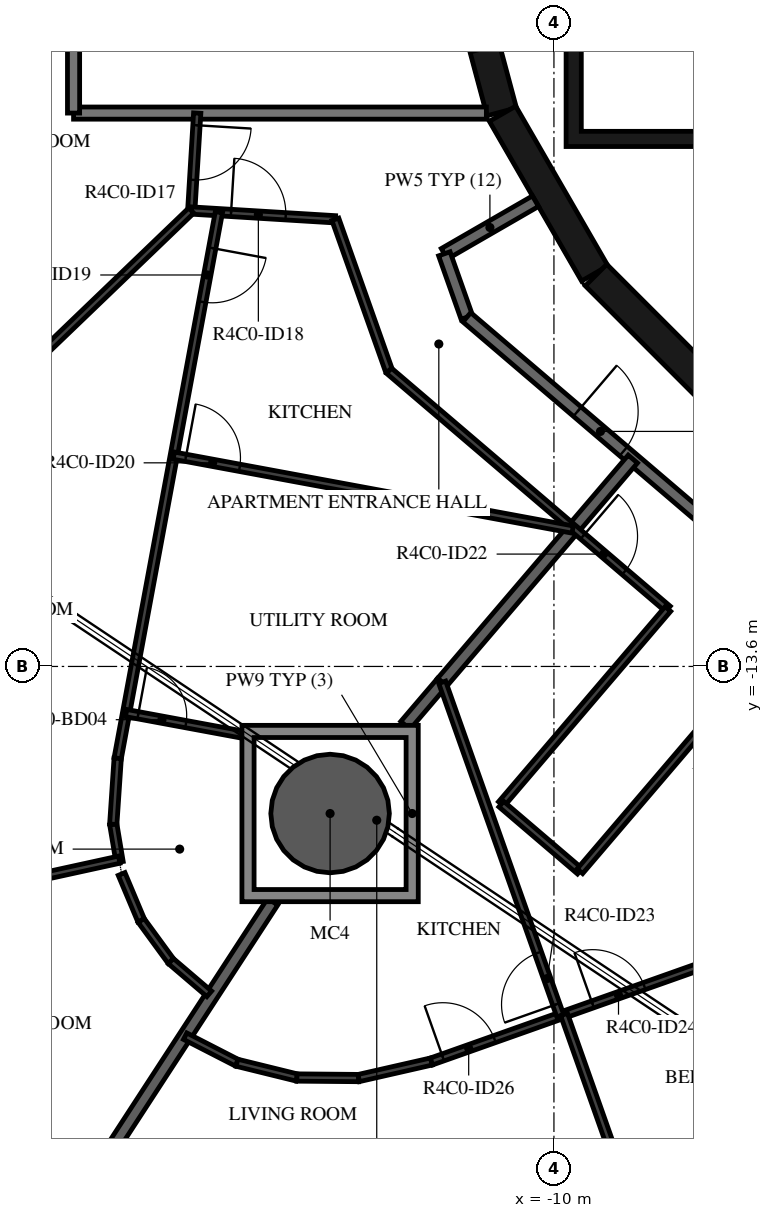
"""IFC4 building model, lengths in metres.
Left out: names, types, materials, properties, quantities, classifications, styles, units other than length and angle.
Written with IfcOpenShell. Run it as: python <this file> out.ifc"""

import sys

from ifc_helpers import new_model, si_unit, direction, frame, frame_2d, origin, origin_2d, place, context, subcontext, project, spatial, polyline, rectangle, hollow_circle, outline, extrude, element, fill, save


model = new_model("IFC4")
c1 = context("Model", 3, precision=1e-05, world=origin(), true_north=direction((0.0, 1.0)))
c2 = subcontext(c1, "Body", "Model", "MODEL_VIEW")
j1 = project(units=[si_unit("LENGTHUNIT", "METRE"), si_unit("PLANEANGLEUNIT", "RADIAN")], contexts=[c1])
p1 = place(None, origin())
s1 = spatial("IfcSite", under=j1, at=p1, CompositionType="ELEMENT")
p2 = place(p1, origin())
s2 = spatial("IfcBuilding", under=s1, at=p2, CompositionType="ELEMENT")
p3 = place(p2, frame((0.0, 0.0, 179.7)))
s3 = spatial("IfcBuildingStorey", under=s2, at=p3, CompositionType="ELEMENT", Elevation=179.7)
p4 = place(p3, frame((-13.681, -16.019, -0.38), z_axis=(0.0, 0.0, 1.0), x_axis=(1.0, 0.0, 0.0)))
e1 = element("IfcColumn", 1, at=p4, inside=s3, PredefinedType="COLUMN", context=c2, shape_type="SweptSolid", body=[
    extrude(hollow_circle(Radius=0.975, WallThickness=0.045, at=origin_2d()), origin(), (0.0, 0.0, 1.0), 2.616),
])
p5 = place(p3, frame((-11.643, -1.55, 0.0), z_axis=(0.0, 0.0, 1.0), x_axis=(0.258734743916, -0.965948410781, 0.0)))
e2 = element("IfcWall", 2, at=p5, inside=s3, PredefinedType="SHEAR", context=c2, shape_type="SweptSolid", body=[
    extrude(rectangle(XDim=3.033, YDim=0.5, at=frame_2d((1.516, 0.0))), origin(), (0.0, 0.0, 1.0), 3.05),
])
p6 = place(p5, frame((1.066, 0.0, 0.0)))
e3 = element("IfcOpeningElement", 3, at=p6, cuts=e2, PredefinedType="OPENING", context=c2, shape_type="SweptSolid", body=[
    extrude(rectangle(XDim=0.9, YDim=2.1, at=frame_2d((0.45, 1.05))), frame((0.0, 0.26, 0.0), z_axis=(0.0, -1.0, 0.0), x_axis=(1.0, 0.0, 0.0)), (0.0, 0.0, 1.0), 0.52),
])
p7 = place(p3, frame((-10.845, -4.51, 0.0), z_axis=(0.0, 0.0, 1.0), x_axis=(0.500087131594, -0.865975092491, 0.0)))
e4 = element("IfcWall", 4, at=p7, inside=s3, PredefinedType="SHEAR", context=c2, shape_type="SweptSolid", body=[
    extrude(rectangle(XDim=3.033, YDim=0.5, at=frame_2d((1.516, 0.0))), origin(), (0.0, 0.0, 1.0), 3.05),
])
p8 = place(p3, frame((-9.308, -7.164, 0.0), z_axis=(0.0, 0.0, 1.0), x_axis=(0.707106781187, -0.707106781187, 0.0)))
e5 = element("IfcWall", 5, at=p8, inside=s3, PredefinedType="SHEAR", context=c2, shape_type="SweptSolid", body=[
    extrude(rectangle(XDim=3.032, YDim=0.5, at=frame_2d((1.516, 0.0))), origin(), (0.0, 0.0, 1.0), 3.05),
])
p9 = place(p3, origin())
e6 = element("IfcWall", 6, at=p9, inside=s3, PredefinedType="SHEAR", context=c2, shape_type="SweptSolid", body=[
    extrude(outline(polyline([(9.8, -5.05), (9.8, -4.8), (9.8, -1.9), (9.55, -1.9), (9.55, -4.8), (7.65, -4.8), (7.65, -1.9), (7.4, -1.9), (7.4, -4.8), (5.5, -4.8), (5.5, -1.9), (5.25, -1.9), (5.25, -4.8), (3.35, -4.8), (3.35, -1.9), (3.1, -1.9), (3.1, -4.8), (1.2, -4.8), (1.2, -1.9), (0.95, -1.9), (0.95, -4.8), (-5.25, -4.8), (-5.25, -1.9), (-5.5, -1.9), (-5.5, -4.8), (-7.4, -4.8), (-7.4, -1.9), (-7.65, -1.9), (-7.65, -4.8), (-9.55, -4.8), (-9.55, -1.9), (-9.8, -1.9), (-9.8, -4.8), (-9.8, -5.05), (9.8, -5.05)])), origin(), (0.0, 0.0, 1.0), 3.05),
])
p10 = place(p3, frame((-10.303, -5.949, 0.0), z_axis=(0.0, 0.0, 1.0), x_axis=(-0.866021168401, -0.500007335828, 0.0)))
e7 = element("IfcWall", 7, at=p10, inside=s3, PredefinedType="STANDARD", context=c2, shape_type="SweptSolid", body=[
    extrude(rectangle(XDim=1.731, YDim=0.2, at=frame_2d((0.865, 0.0))), origin(), (0.0, 0.0, 1.0), 3.05),
])
p11 = place(p3, frame((-11.802, -6.814, 0.0), z_axis=(0.0, 0.0, 1.0), x_axis=(0.333904297771, -0.942606980629, 0.0)))
e8 = element("IfcWall", 8, at=p11, inside=s3, PredefinedType="STANDARD", context=c2, shape_type="SweptSolid", body=[
    extrude(rectangle(XDim=1.107, YDim=0.2, at=frame_2d((0.553, 0.0))), origin(), (0.0, 0.0, 1.0), 3.05),
])
p12 = place(p3, frame((-11.433, -7.858, 0.0), z_axis=(0.0, 0.0, 1.0), x_axis=(0.760412154545, -0.649440801937, 0.0)))
e9 = element("IfcWall", 9, at=p12, inside=s3, PredefinedType="STANDARD", context=c2, shape_type="SweptSolid", body=[
    extrude(rectangle(XDim=7.181, YDim=0.2, at=frame_2d((3.59, 0.0))), origin(), (0.0, 0.0, 1.0), 3.05),
])
p13 = place(p12, frame((2.39, 0.0, 0.0)))
e10 = element("IfcOpeningElement", 10, at=p13, cuts=e9, PredefinedType="OPENING", context=c2, shape_type="SweptSolid", body=[
    extrude(rectangle(XDim=1.0, YDim=2.1, at=frame_2d((0.5, 1.05))), frame((0.0, 0.11, 0.0), z_axis=(0.0, -1.0, 0.0), x_axis=(1.0, 0.0, 0.0)), (0.0, 0.0, 1.0), 0.22),
])
p14 = place(p3, frame((-17.9, -4.5, 0.0), z_axis=(0.0, 0.0, 1.0), x_axis=(1.0, 0.0, 0.0)))
e11 = element("IfcWall", 11, at=p14, inside=s3, PredefinedType="STANDARD", context=c2, shape_type="SweptSolid", body=[
    extrude(rectangle(XDim=6.789, YDim=0.2, at=frame_2d((3.394, 0.0))), origin(), (0.0, 0.0, 1.0), 3.05),
])
p15 = place(p3, frame((-17.9, 4.5, 0.0), z_axis=(0.0, 0.0, 1.0), x_axis=(0.0, -1.0, 0.0)))
e12 = element("IfcWall", 12, at=p15, inside=s3, PredefinedType="STANDARD", context=c2, shape_type="SweptSolid", body=[
    extrude(rectangle(XDim=9.0, YDim=0.2, at=frame_2d((4.5, 0.0))), origin(), (0.0, 0.0, 1.0), 3.05),
])
p16 = place(p3, frame((-11.838, -13.86, 0.0), z_axis=(0.0, 0.0, 1.0), x_axis=(0.64944503311, 0.760408540831, 0.0)))
e13 = element("IfcWall", 13, at=p16, inside=s3, PredefinedType="STANDARD", context=c2, shape_type="SweptSolid", body=[
    extrude(rectangle(XDim=4.827, YDim=0.2, at=frame_2d((2.414, 0.0))), origin(), (0.0, 0.0, 1.0), 3.05),
])
p17 = place(p3, frame((-12.443, -14.569, 0.0), z_axis=(0.0, 0.0, 1.0), x_axis=(0.649517408851, 0.760346720648, 0.0)))
e14 = element("IfcWall", 14, at=p17, inside=s3, PredefinedType="STANDARD", context=c2, shape_type="SweptSolid", body=[
    extrude(rectangle(XDim=0.932, YDim=0.2, at=frame_2d((0.466, 0.0))), origin(), (0.0, 0.0, 1.0), 3.05),
])
p18 = place(p3, frame((-18.04, -22.713, 0.0), z_axis=(0.0, 0.0, 1.0), x_axis=(0.545628572271, 0.838027124335, 0.0)))
e15 = element("IfcWall", 15, at=p18, inside=s3, PredefinedType="STANDARD", context=c2, shape_type="SweptSolid", body=[
    extrude(rectangle(XDim=6.258, YDim=0.2, at=frame_2d((3.129, 0.0))), origin(), (0.0, 0.0, 1.0), 3.05),
])
p19 = place(p3, frame((-15.866, -4.5, 0.0), z_axis=(0.0, 0.0, 1.0), x_axis=(-0.060986374837, -0.998138598635, 0.0)))
e16 = element("IfcWall", 16, at=p19, inside=s3, PredefinedType="PARTITIONING", context=c2, shape_type="SweptSolid", body=[
    extrude(rectangle(XDim=1.605, YDim=0.12, at=frame_2d((0.803, 0.0))), origin(), (0.0, 0.0, 1.0), 3.05),
])
p20 = place(p19, frame((0.2, 0.0, 0.0)))
e17 = element("IfcOpeningElement", 17, at=p20, cuts=e16, PredefinedType="OPENING", context=c2, shape_type="SweptSolid", body=[
    extrude(rectangle(XDim=0.9, YDim=2.1, at=frame_2d((0.45, 1.05))), frame((0.0, 0.07, 0.0), z_axis=(0.0, -1.0, 0.0), x_axis=(1.0, 0.0, 0.0)), (0.0, 0.0, 1.0), 0.14),
])
p21 = place(p3, frame((-15.964, -6.102, 0.0), z_axis=(0.0, 0.0, 1.0), x_axis=(0.998145469708, -0.060873814574, 0.0)))
e18 = element("IfcWall", 18, at=p21, inside=s3, PredefinedType="PARTITIONING", context=c2, shape_type="SweptSolid", body=[
    extrude(rectangle(XDim=2.374, YDim=0.12, at=frame_2d((1.187, 0.0))), origin(), (0.0, 0.0, 1.0), 3.05),
])
p22 = place(p21, frame((0.656, 0.0, 0.0)))
e19 = element("IfcOpeningElement", 19, at=p22, cuts=e18, PredefinedType="OPENING", context=c2, shape_type="SweptSolid", body=[
    extrude(rectangle(XDim=0.9, YDim=2.1, at=frame_2d((0.45, 1.05))), frame((0.0, 0.07, 0.0), z_axis=(0.0, -1.0, 0.0), x_axis=(1.0, 0.0, 0.0)), (0.0, 0.0, 1.0), 0.14),
])
p23 = place(p3, frame((-13.594, -6.247, 0.0), z_axis=(0.0, 0.0, 1.0), x_axis=(0.333777006894, -0.942652061828, 0.0)))
e20 = element("IfcWall", 20, at=p23, inside=s3, PredefinedType="PARTITIONING", context=c2, shape_type="SweptSolid", body=[
    extrude(rectangle(XDim=2.642, YDim=0.12, at=frame_2d((1.321, 0.0))), origin(), (0.0, 0.0, 1.0), 3.05),
])
p24 = place(p3, frame((-12.713, -8.737, 0.0), z_axis=(0.0, 0.0, 1.0), x_axis=(0.760432387723, -0.649417110725, 0.0)))
e21 = element("IfcWall", 21, at=p24, inside=s3, PredefinedType="PARTITIONING", context=c2, shape_type="SweptSolid", body=[
    extrude(rectangle(XDim=6.032, YDim=0.12, at=frame_2d((3.016, 0.0))), origin(), (0.0, 0.0, 1.0), 3.05),
])
p25 = place(p24, frame((4.192, 0.0, 0.0)))
e22 = element("IfcOpeningElement", 22, at=p25, cuts=e21, PredefinedType="OPENING", context=c2, shape_type="SweptSolid", body=[
    extrude(rectangle(XDim=0.9, YDim=2.1, at=frame_2d((0.45, 1.05))), frame((0.0, 0.07, 0.0), z_axis=(0.0, -1.0, 0.0), x_axis=(1.0, 0.0, 0.0)), (0.0, 0.0, 1.0), 0.14),
])
p26 = place(p3, frame((-20.849, -10.792, 0.0), z_axis=(0.0, 0.0, 1.0), x_axis=(0.721364983662, 0.692555095531, 0.0)))
e23 = element("IfcWall", 23, at=p26, inside=s3, PredefinedType="PARTITIONING", context=c2, shape_type="SweptSolid", body=[
    extrude(rectangle(XDim=6.771, YDim=0.12, at=frame_2d((3.385, 0.0))), origin(), (0.0, 0.0, 1.0), 3.05),
])
p27 = place(p3, frame((-15.51, -6.13, 0.0), z_axis=(0.0, 0.0, 1.0), x_axis=(-0.182243361628, -0.98325345519, 0.0)))
e24 = element("IfcWall", 24, at=p27, inside=s3, PredefinedType="PARTITIONING", context=c2, shape_type="SweptSolid", body=[
    extrude(rectangle(XDim=9.134, YDim=0.12, at=frame_2d((4.567, 0.0))), origin(), (0.0, 0.0, 1.0), 3.05),
])
p28 = place(p27, frame((0.6, 0.0, 0.0)))
e25 = element("IfcOpeningElement", 25, at=p28, cuts=e24, PredefinedType="OPENING", context=c2, shape_type="SweptSolid", body=[
    extrude(rectangle(XDim=0.9, YDim=2.1, at=frame_2d((0.45, 1.05))), frame((0.0, 0.07, 0.0), z_axis=(0.0, -1.0, 0.0), x_axis=(1.0, 0.0, 0.0)), (0.0, 0.0, 1.0), 0.14),
])
p29 = place(p3, frame((-16.252, -10.133, 0.0), z_axis=(0.0, 0.0, 1.0), x_axis=(0.983256998026, -0.182224246005, 0.0)))
e26 = element("IfcWall", 26, at=p29, inside=s3, PredefinedType="PARTITIONING", context=c2, shape_type="SweptSolid", body=[
    extrude(rectangle(XDim=6.671, YDim=0.12, at=frame_2d((3.335, 0.0))), origin(), (0.0, 0.0, 1.0), 3.05),
])
p30 = place(p29, frame((0.2, 0.0, 0.0)))
e27 = element("IfcOpeningElement", 27, at=p30, cuts=e26, PredefinedType="OPENING", context=c2, shape_type="SweptSolid", body=[
    extrude(rectangle(XDim=0.9, YDim=2.1, at=frame_2d((0.45, 1.05))), frame((0.0, 0.07, 0.0), z_axis=(0.0, -1.0, 0.0), x_axis=(1.0, 0.0, 0.0)), (0.0, 0.0, 1.0), 0.14),
])
p31 = place(p3, frame((-17.143, -16.817, 0.0), z_axis=(0.0, 0.0, 1.0), x_axis=(-0.164964120994, 0.98629956848, 0.0)))
e28 = element("IfcWall", 28, at=p31, inside=s3, PredefinedType="PARTITIONING", context=c2, shape_type="SweptSolid", body=[
    extrude(rectangle(XDim=0.63, YDim=0.12, at=frame_2d((0.315, 0.0))), origin(), (0.0, 0.0, 1.0), 3.05),
])
p32 = place(p3, frame((-17.247, -16.195, 0.0), z_axis=(0.0, 0.0, 1.0), x_axis=(0.066712820538, 0.997772218282, 0.0)))
e29 = element("IfcWall", 29, at=p32, inside=s3, PredefinedType="PARTITIONING", context=c2, shape_type="SweptSolid", body=[
    extrude(rectangle(XDim=1.087, YDim=0.12, at=frame_2d((0.543, 0.0))), origin(), (0.0, 0.0, 1.0), 3.05),
])
p33 = place(p3, frame((-21.453, -17.719, 0.0), z_axis=(0.0, 0.0, 1.0), x_axis=(0.976887361549, 0.213754725903, 0.0)))
e30 = element("IfcWall", 30, at=p33, inside=s3, PredefinedType="PARTITIONING", context=c2, shape_type="SweptSolid", body=[
    extrude(rectangle(XDim=4.405, YDim=0.12, at=frame_2d((2.203, 0.0))), origin(), (0.0, 0.0, 1.0), 3.05),
])
p34 = place(p33, frame((0.2, 0.0, 0.0)))
e31 = element("IfcOpeningElement", 31, at=p34, cuts=e30, PredefinedType="OPENING", context=c2, shape_type="SweptSolid", body=[
    extrude(rectangle(XDim=0.9, YDim=2.1, at=frame_2d((0.45, 1.05))), frame((0.0, 0.07, 0.0), z_axis=(0.0, -1.0, 0.0), x_axis=(1.0, 0.0, 0.0)), (0.0, 0.0, 1.0), 0.14),
])
p35 = place(p3, frame((-17.036, -14.366, 0.0), z_axis=(0.0, 0.0, 1.0), x_axis=(0.983259435886, -0.182211091156, 0.0)))
e32 = element("IfcWall", 32, at=p35, inside=s3, PredefinedType="PARTITIONING", context=c2, shape_type="SweptSolid", body=[
    extrude(rectangle(XDim=1.938, YDim=0.12, at=frame_2d((0.969, 0.0))), origin(), (0.0, 0.0, 1.0), 3.05),
])
p36 = place(p35, frame((0.2, 0.0, 0.0)))
e33 = element("IfcOpeningElement", 33, at=p36, cuts=e32, PredefinedType="OPENING", context=c2, shape_type="SweptSolid", body=[
    extrude(rectangle(XDim=0.8, YDim=2.1, at=frame_2d((0.4, 1.05))), frame((0.0, 0.07, 0.0), z_axis=(0.0, -1.0, 0.0), x_axis=(1.0, 0.0, 0.0)), (0.0, 0.0, 1.0), 0.14),
])
for number, where, z_axis, x_axis in (
    (34, (-17.11, -17.013, 0.0), (0.0, 0.0, 1.0), (0.388, -0.922, 0.0)),
    (35, (-16.788, -17.777, 0.0), (0.0, 0.0, 1.0), (0.59, -0.807, 0.0)),
    (36, (-16.299, -18.446, 0.0), (0.0, 0.0, 1.0), (0.76, -0.649, 0.0)),
):
    element("IfcWall", number, at=place(p3, frame(where, z_axis=z_axis, x_axis=x_axis)), inside=s3, PredefinedType="PARTITIONING", context=c2, shape_type="SweptSolid", body=[
        extrude(rectangle(XDim=0.829, YDim=0.12, at=frame_2d((0.415, 0.0))), origin(), (0.0, 0.0, 1.0), 3.05),
    ])
p37 = place(p3, frame((-8.125, -12.655, 0.0), z_axis=(0.0, 0.0, 1.0), x_axis=(-0.649441944702, -0.760411178549, 0.0)))
e37 = element("IfcWall", 37, at=p37, inside=s3, PredefinedType="PARTITIONING", context=c2, shape_type="SweptSolid", body=[
    extrude(rectangle(XDim=4.22, YDim=0.12, at=frame_2d((2.11, 0.0))), origin(), (0.0, 0.0, 1.0), 3.05),
])
p38 = place(p3, frame((-10.866, -15.864, 0.0), z_axis=(0.0, 0.0, 1.0), x_axis=(0.760431300628, -0.649418383652, 0.0)))
e38 = element("IfcWall", 38, at=p38, inside=s3, PredefinedType="PARTITIONING", context=c2, shape_type="SweptSolid", body=[
    extrude(rectangle(XDim=1.7, YDim=0.12, at=frame_2d((0.85, 0.0))), origin(), (0.0, 0.0, 1.0), 3.05),
])
p39 = place(p3, frame((-9.573, -16.968, 0.0), z_axis=(0.0, 0.0, 1.0), x_axis=(0.649437062208, 0.760415348498, 0.0)))
e39 = element("IfcWall", 39, at=p39, inside=s3, PredefinedType="PARTITIONING", context=c2, shape_type="SweptSolid", body=[
    extrude(rectangle(XDim=4.219, YDim=0.12, at=frame_2d((2.11, 0.0))), origin(), (0.0, 0.0, 1.0), 3.05),
])
p40 = place(p3, frame((-16.065, -19.68, 0.0), z_axis=(0.0, 0.0, 1.0), x_axis=(0.889684645268, -0.456575549033, 0.0)))
e40 = element("IfcWall", 40, at=p40, inside=s3, PredefinedType="PARTITIONING", context=c2, shape_type="SweptSolid", body=[
    extrude(rectangle(XDim=0.957, YDim=0.12, at=frame_2d((0.479, 0.0))), origin(), (0.0, 0.0, 1.0), 3.05),
])
p41 = place(p3, frame((-15.214, -20.117, 0.0), z_axis=(0.0, 0.0, 1.0), x_axis=(0.970998575146, -0.239085271534, 0.0)))
e41 = element("IfcWall", 41, at=p41, inside=s3, PredefinedType="PARTITIONING", context=c2, shape_type="SweptSolid", body=[
    extrude(rectangle(XDim=1.016, YDim=0.12, at=frame_2d((0.508, 0.0))), origin(), (0.0, 0.0, 1.0), 3.05),
])
p42 = place(p3, frame((-14.227, -20.36, 0.0), z_axis=(0.0, 0.0, 1.0), x_axis=(0.999960467683, -0.008891741722, 0.0)))
e42 = element("IfcWall", 42, at=p42, inside=s3, PredefinedType="PARTITIONING", context=c2, shape_type="SweptSolid", body=[
    extrude(rectangle(XDim=1.016, YDim=0.12, at=frame_2d((0.508, 0.0))), origin(), (0.0, 0.0, 1.0), 3.05),
])
p43 = place(p3, frame((-13.211, -20.369, 0.0), z_axis=(0.0, 0.0, 1.0), x_axis=(0.974997834831, 0.222214360642, 0.0)))
e43 = element("IfcWall", 43, at=p43, inside=s3, PredefinedType="PARTITIONING", context=c2, shape_type="SweptSolid", body=[
    extrude(rectangle(XDim=1.227, YDim=0.12, at=frame_2d((0.614, 0.0))), origin(), (0.0, 0.0, 1.0), 3.05),
])
p44 = place(p3, frame((-12.015, -20.096, 0.0), z_axis=(0.0, 0.0, 1.0), x_axis=(0.942638913957, 0.33381413675, 0.0)))
e44 = element("IfcWall", 44, at=p44, inside=s3, PredefinedType="PARTITIONING", context=c2, shape_type="SweptSolid", body=[
    extrude(rectangle(XDim=14.104, YDim=0.12, at=frame_2d((7.052, 0.0))), origin(), (0.0, 0.0, 1.0), 3.05),
])
p45 = place(p44, frame((2.814, 0.0, 0.0)))
e45 = element("IfcOpeningElement", 45, at=p45, cuts=e44, PredefinedType="OPENING", context=c2, shape_type="SweptSolid", body=[
    extrude(rectangle(XDim=0.9, YDim=2.1, at=frame_2d((0.45, 1.05))), frame((0.0, 0.07, 0.0), z_axis=(0.0, -1.0, 0.0), x_axis=(1.0, 0.0, 0.0)), (0.0, 0.0, 1.0), 0.14),
])
p46 = place(p44, frame((6.444, 0.0, 0.0)))
e46 = element("IfcOpeningElement", 46, at=p46, cuts=e44, PredefinedType="OPENING", context=c2, shape_type="SweptSolid", body=[
    extrude(rectangle(XDim=0.9, YDim=2.1, at=frame_2d((0.45, 1.05))), frame((0.0, 0.07, 0.0), z_axis=(0.0, -1.0, 0.0), x_axis=(1.0, 0.0, 0.0)), (0.0, 0.0, 1.0), 0.14),
])
p47 = place(p44, frame((0.2, 0.0, 0.0)))
e47 = element("IfcOpeningElement", 47, at=p47, cuts=e44, PredefinedType="OPENING", context=c2, shape_type="SweptSolid", body=[
    extrude(rectangle(XDim=0.9, YDim=2.1, at=frame_2d((0.45, 1.05))), frame((0.0, 0.07, 0.0), z_axis=(0.0, -1.0, 0.0), x_axis=(1.0, 0.0, 0.0)), (0.0, 0.0, 1.0), 0.14),
])
p48 = place(p3, frame((-9.895, -19.346, 0.0), z_axis=(0.0, 0.0, 1.0), x_axis=(-0.333781129158, 0.942650602195, 0.0)))
e48 = element("IfcWall", 48, at=p48, inside=s3, PredefinedType="PARTITIONING", context=c2, shape_type="SweptSolid", body=[
    extrude(rectangle(XDim=5.819, YDim=0.12, at=frame_2d((2.91, 0.0))), origin(), (0.0, 0.0, 1.0), 3.05),
])
p49 = place(p48, frame((0.2, 0.0, 0.0)))
e49 = element("IfcOpeningElement", 49, at=p49, cuts=e48, PredefinedType="OPENING", context=c2, shape_type="SweptSolid", body=[
    extrude(rectangle(XDim=0.9, YDim=2.1, at=frame_2d((0.45, 1.05))), frame((0.0, 0.07, 0.0), z_axis=(0.0, -1.0, 0.0), x_axis=(1.0, 0.0, 0.0)), (0.0, 0.0, 1.0), 0.14),
])
p50 = place(p3, frame((-8.632, -22.718, 0.0), z_axis=(0.0, 0.0, 1.0), x_axis=(-0.333791905243, 0.942646786445, 0.0)))
e50 = element("IfcWall", 50, at=p50, inside=s3, PredefinedType="PARTITIONING", context=c2, shape_type="SweptSolid", body=[
    extrude(rectangle(XDim=3.6, YDim=0.12, at=frame_2d((1.8, 0.0))), origin(), (0.0, 0.0, 1.0), 3.05),
])
p51 = place(p3, origin())
e51 = element("IfcWall", 51, at=p51, inside=s3, PredefinedType="STANDARD", context=c2, shape_type="SweptSolid", body=[
    extrude(outline(polyline([(-12.231, -14.569), (-12.231, -17.469), (-15.131, -17.469), (-15.131, -14.569), (-12.231, -14.569)]), holes=[polyline([(-14.931, -17.269), (-12.431, -17.269), (-12.431, -14.769), (-14.931, -14.769), (-14.931, -17.269)])]), origin(), (0.0, 0.0, 1.0), 3.05),
])
p52 = place(p13, origin())
e52 = element("IfcDoor", 52, at=p52, inside=s3, OperationType="SINGLE_SWING_RIGHT", PredefinedType="DOOR", context=c2, shape_type="SweptSolid", body=[
    extrude(rectangle(XDim=1.0, YDim=2.1, at=frame_2d((0.5, 1.05))), frame((0.0, 0.025, 0.0), z_axis=(0.0, -1.0, 0.0), x_axis=(1.0, 0.0, 0.0)), (0.0, 0.0, 1.0), 0.05),
])
fill(e10, e52)
p53 = place(p20, origin())
e53 = element("IfcDoor", 53, at=p53, inside=s3, OperationType="SINGLE_SWING_RIGHT", PredefinedType="DOOR", context=c2, shape_type="SweptSolid", body=[
    extrude(rectangle(XDim=0.9, YDim=2.1, at=frame_2d((0.45, 1.05))), frame((0.0, 0.025, 0.0), z_axis=(0.0, -1.0, 0.0), x_axis=(1.0, 0.0, 0.0)), (0.0, 0.0, 1.0), 0.05),
])
fill(e17, e53)
p54 = place(p22, origin())
e54 = element("IfcDoor", 54, at=p54, inside=s3, OperationType="SINGLE_SWING_RIGHT", PredefinedType="DOOR", context=c2, shape_type="SweptSolid", body=[
    extrude(rectangle(XDim=0.9, YDim=2.1, at=frame_2d((0.45, 1.05))), frame((0.0, 0.025, 0.0), z_axis=(0.0, -1.0, 0.0), x_axis=(1.0, 0.0, 0.0)), (0.0, 0.0, 1.0), 0.05),
])
fill(e19, e54)
p55 = place(p28, origin())
e55 = element("IfcDoor", 55, at=p55, inside=s3, OperationType="SINGLE_SWING_RIGHT", PredefinedType="DOOR", context=c2, shape_type="SweptSolid", body=[
    extrude(rectangle(XDim=0.9, YDim=2.1, at=frame_2d((0.45, 1.05))), frame((0.0, 0.025, 0.0), z_axis=(0.0, -1.0, 0.0), x_axis=(1.0, 0.0, 0.0)), (0.0, 0.0, 1.0), 0.05),
])
fill(e25, e55)
p56 = place(p30, origin())
e56 = element("IfcDoor", 56, at=p56, inside=s3, OperationType="SINGLE_SWING_RIGHT", PredefinedType="DOOR", context=c2, shape_type="SweptSolid", body=[
    extrude(rectangle(XDim=0.9, YDim=2.1, at=frame_2d((0.45, 1.05))), frame((0.0, 0.025, 0.0), z_axis=(0.0, -1.0, 0.0), x_axis=(1.0, 0.0, 0.0)), (0.0, 0.0, 1.0), 0.05),
])
fill(e27, e56)
p57 = place(p36, origin())
e57 = element("IfcDoor", 57, at=p57, inside=s3, OperationType="SINGLE_SWING_RIGHT", PredefinedType="DOOR", context=c2, shape_type="SweptSolid", body=[
    extrude(rectangle(XDim=0.8, YDim=2.1, at=frame_2d((0.4, 1.05))), frame((0.0, 0.025, 0.0), z_axis=(0.0, -1.0, 0.0), x_axis=(1.0, 0.0, 0.0)), (0.0, 0.0, 1.0), 0.05),
])
fill(e33, e57)
p58 = place(p25, origin())
e58 = element("IfcDoor", 58, at=p58, inside=s3, OperationType="SINGLE_SWING_LEFT", PredefinedType="DOOR", context=c2, shape_type="SweptSolid", body=[
    extrude(rectangle(XDim=0.9, YDim=2.1, at=frame_2d((0.45, 1.05))), frame((0.0, 0.025, 0.0), z_axis=(0.0, -1.0, 0.0), x_axis=(1.0, 0.0, 0.0)), (0.0, 0.0, 1.0), 0.05),
])
fill(e22, e58)
p59 = place(p49, origin())
e59 = element("IfcDoor", 59, at=p59, inside=s3, OperationType="SINGLE_SWING_LEFT", PredefinedType="DOOR", context=c2, shape_type="SweptSolid", body=[
    extrude(rectangle(XDim=0.9, YDim=2.1, at=frame_2d((0.45, 1.05))), frame((0.0, 0.025, 0.0), z_axis=(0.0, -1.0, 0.0), x_axis=(1.0, 0.0, 0.0)), (0.0, 0.0, 1.0), 0.05),
])
fill(e49, e59)
p60 = place(p45, origin())
e60 = element("IfcDoor", 60, at=p60, inside=s3, OperationType="SINGLE_SWING_LEFT", PredefinedType="DOOR", context=c2, shape_type="SweptSolid", body=[
    extrude(rectangle(XDim=0.9, YDim=2.1, at=frame_2d((0.45, 1.05))), frame((0.0, 0.025, 0.0), z_axis=(0.0, -1.0, 0.0), x_axis=(1.0, 0.0, 0.0)), (0.0, 0.0, 1.0), 0.05),
])
fill(e45, e60)
p61 = place(p47, origin())
e61 = element("IfcDoor", 61, at=p61, inside=s3, OperationType="SINGLE_SWING_RIGHT", PredefinedType="DOOR", context=c2, shape_type="SweptSolid", body=[
    extrude(rectangle(XDim=0.9, YDim=2.1, at=frame_2d((0.45, 1.05))), frame((0.0, 0.025, 0.0), z_axis=(0.0, -1.0, 0.0), x_axis=(1.0, 0.0, 0.0)), (0.0, 0.0, 1.0), 0.05),
])
fill(e47, e61)
save(model, sys.argv[1])
